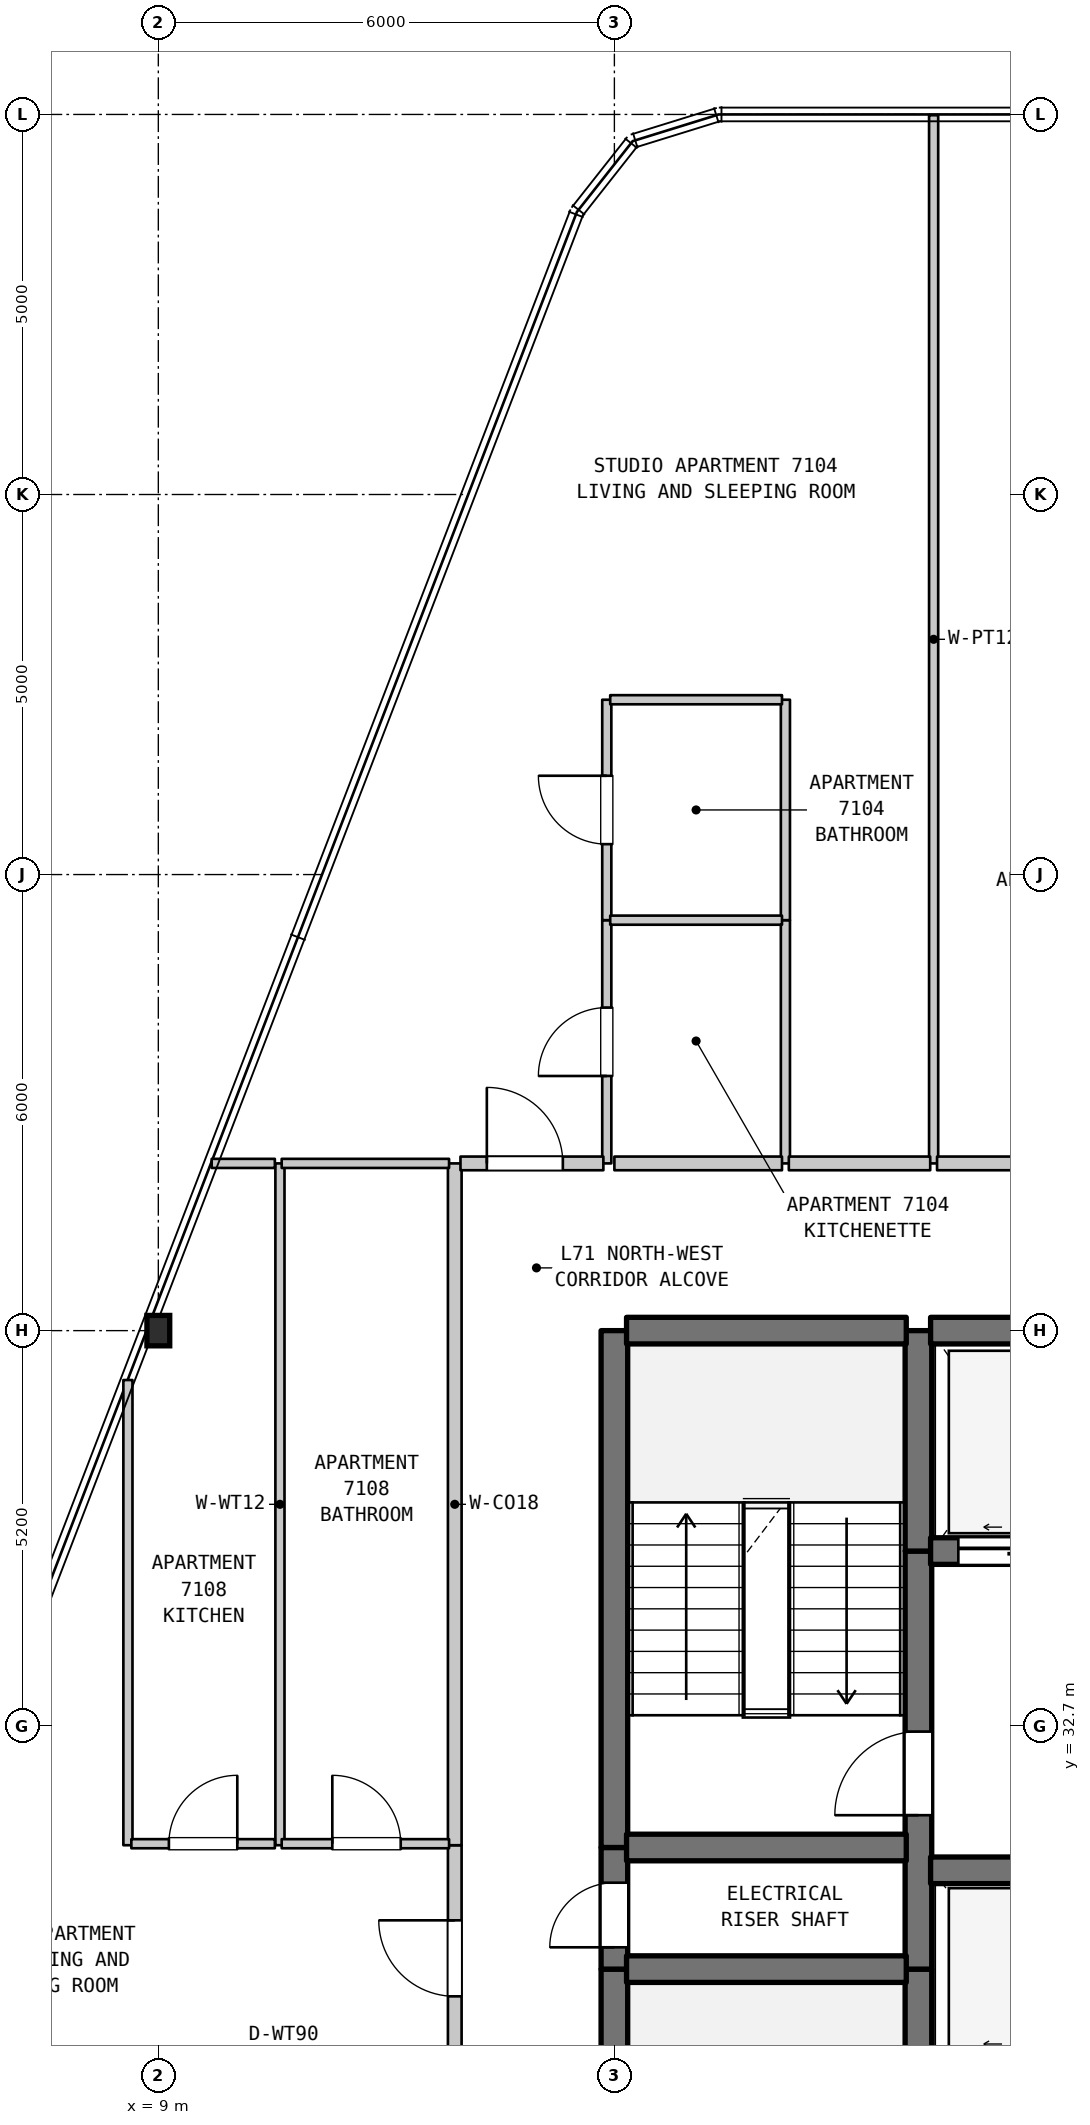
"""IFC4 building model, lengths in metres.
Left out: names, types, materials, properties, quantities, classifications, styles, units other than length and angle.
Written with IfcOpenShell. Run it as: python <this file> out.ifc"""

import sys

from ifc_helpers import new_model, si_unit, direction, frame, frame_2d, origin, origin_2d, place, context, subcontext, project, spatial, rectangle, i_section, extrude, element, fill, save


model = new_model("IFC4")
c1 = context("Model", 3, precision=1e-05, world=origin(), true_north=direction((0.0, 1.0)))
c2 = subcontext(c1, "Body", "Model", "MODEL_VIEW")
j1 = project(units=[si_unit("LENGTHUNIT", "METRE"), si_unit("PLANEANGLEUNIT", "RADIAN")], contexts=[c1])
p1 = place(None, origin())
s1 = spatial("IfcSite", under=j1, at=p1, CompositionType="ELEMENT")
p2 = place(p1, origin())
s2 = spatial("IfcBuilding", under=s1, at=p2, CompositionType="ELEMENT")
p3 = place(p2, frame((0.0, 0.0, 284.3)))
s3 = spatial("IfcBuildingStorey", under=s2, at=p3, CompositionType="ELEMENT", Elevation=284.3)
p4 = place(p3, frame((9.0, 37.9, 0.0), z_axis=(0.0, 0.0, 1.0), x_axis=(1.0, 0.0, 0.0)))
e1 = element("IfcColumn", 1, at=p4, inside=s3, PredefinedType="COLUMN", context=c2, shape_type="SweptSolid", body=[
    extrude(i_section(OverallWidth=0.3, OverallDepth=0.4, WebThickness=0.013, FlangeThickness=0.024, FilletRadius=0.027, at=origin_2d()), origin(), (0.0, 0.0, 1.0), 3.7),
])
p5 = place(p3, frame((8.6, 31.13, 0.0), z_axis=(0.0, 0.0, 1.0), x_axis=(0.0, 1.0, 0.0)))
e2 = element("IfcWall", 2, at=p5, inside=s3, PredefinedType="PARTITIONING", context=c2, shape_type="SweptSolid", body=[
    extrude(rectangle(XDim=6.12, YDim=0.12, at=frame_2d((3.06, 0.0))), origin(), (0.0, 0.0, 1.0), 3.39),
])
p6 = place(p3, frame((10.6, 31.13, 0.0), z_axis=(0.0, 0.0, 1.0), x_axis=(0.0, 1.0, 0.0)))
e3 = element("IfcWall", 3, at=p6, inside=s3, PredefinedType="PARTITIONING", context=c2, shape_type="SweptSolid", body=[
    extrude(rectangle(XDim=8.97, YDim=0.12, at=frame_2d((4.485, 0.0))), origin(), (0.0, 0.0, 1.0), 3.39),
])
p7 = place(p3, frame((12.9, 28.3, 0.0), z_axis=(0.0, 0.0, 1.0), x_axis=(0.0, 1.0, 0.0)))
e4 = element("IfcWall", 4, at=p7, inside=s3, PredefinedType="STANDARD", context=c2, shape_type="SweptSolid", body=[
    extrude(rectangle(XDim=2.83, YDim=0.18, at=frame_2d((1.415, 0.0))), origin(), (0.0, 0.0, 1.0), 3.39),
])
p8 = place(p7, frame((0.842, 0.0, 0.0)))
e5 = element("IfcOpeningElement", 5, at=p8, cuts=e4, PredefinedType="OPENING", context=c2, shape_type="SweptSolid", body=[
    extrude(rectangle(XDim=1.0, YDim=2.15, at=frame_2d((0.5, 1.075))), frame((0.0, 0.1, 0.0), z_axis=(0.0, -1.0, 0.0), x_axis=(1.0, 0.0, 0.0)), (0.0, 0.0, 1.0), 0.2),
])
p9 = place(p3, frame((12.9, 31.13, 0.0), z_axis=(0.0, 0.0, 1.0), x_axis=(0.0, 1.0, 0.0)))
e6 = element("IfcWall", 6, at=p9, inside=s3, PredefinedType="STANDARD", context=c2, shape_type="SweptSolid", body=[
    extrude(rectangle(XDim=8.97, YDim=0.18, at=frame_2d((4.485, 0.0))), origin(), (0.0, 0.0, 1.0), 3.39),
])
p10 = place(p3, frame((14.9, 40.1, 0.0), z_axis=(0.0, 0.0, 1.0), x_axis=(0.0, 1.0, 0.0)))
e7 = element("IfcWall", 7, at=p10, inside=s3, PredefinedType="PARTITIONING", context=c2, shape_type="SweptSolid", body=[
    extrude(rectangle(XDim=3.2, YDim=0.12, at=frame_2d((1.6, 0.0))), origin(), (0.0, 0.0, 1.0), 3.39),
])
p11 = place(p10, frame((1.15, 0.0, 0.0)))
e8 = element("IfcOpeningElement", 8, at=p11, cuts=e7, PredefinedType="OPENING", context=c2, shape_type="SweptSolid", body=[
    extrude(rectangle(XDim=0.9, YDim=2.15, at=frame_2d((0.45, 1.075))), frame((0.0, 0.07, 0.0), z_axis=(0.0, -1.0, 0.0), x_axis=(1.0, 0.0, 0.0)), (0.0, 0.0, 1.0), 0.14),
])
p12 = place(p3, frame((14.9, 43.3, 0.0), z_axis=(0.0, 0.0, 1.0), x_axis=(0.0, 1.0, 0.0)))
e9 = element("IfcWall", 9, at=p12, inside=s3, PredefinedType="PARTITIONING", context=c2, shape_type="SweptSolid", body=[
    extrude(rectangle(XDim=2.9, YDim=0.12, at=frame_2d((1.45, 0.0))), origin(), (0.0, 0.0, 1.0), 3.39),
])
p13 = place(p12, frame((1.0, 0.0, 0.0)))
e10 = element("IfcOpeningElement", 10, at=p13, cuts=e9, PredefinedType="OPENING", context=c2, shape_type="SweptSolid", body=[
    extrude(rectangle(XDim=0.9, YDim=2.1, at=frame_2d((0.45, 1.05))), frame((0.0, 0.07, 0.0), z_axis=(0.0, -1.0, 0.0), x_axis=(1.0, 0.0, 0.0)), (0.0, 0.0, 1.0), 0.14),
])
p14 = place(p3, frame((15.0, 22.7, 0.0), z_axis=(0.0, 0.0, 1.0), x_axis=(0.0, 1.0, 0.0)))
e11 = element("IfcWall", 11, at=p14, inside=s3, PredefinedType="SHEAR", context=c2, shape_type="SweptSolid", body=[
    extrude(rectangle(XDim=6.8, YDim=0.35, at=frame_2d((3.4, 0.0))), origin(), (0.0, 0.0, 1.0), 3.39),
])
p15 = place(p3, frame((15.0, 29.5, 0.0), z_axis=(0.0, 0.0, 1.0), x_axis=(0.0, 1.0, 0.0)))
e12 = element("IfcWall", 12, at=p15, inside=s3, PredefinedType="SHEAR", context=c2, shape_type="SweptSolid", body=[
    extrude(rectangle(XDim=1.6, YDim=0.35, at=frame_2d((0.8, 0.0))), origin(), (0.0, 0.0, 1.0), 3.39),
])
p16 = place(p15, frame((0.287, 0.0, 0.0)))
e13 = element("IfcOpeningElement", 13, at=p16, cuts=e12, PredefinedType="OPENING", context=c2, shape_type="SweptSolid", body=[
    extrude(rectangle(XDim=0.85, YDim=2.1, at=frame_2d((0.425, 1.05))), frame((0.0, 0.185, 0.0), z_axis=(0.0, -1.0, 0.0), x_axis=(1.0, 0.0, 0.0)), (0.0, 0.0, 1.0), 0.37),
])
p17 = place(p3, frame((15.0, 31.1, 0.0), z_axis=(0.0, 0.0, 1.0), x_axis=(0.0, 1.0, 0.0)))
e14 = element("IfcWall", 14, at=p17, inside=s3, PredefinedType="SHEAR", context=c2, shape_type="SweptSolid", body=[
    extrude(rectangle(XDim=6.8, YDim=0.35, at=frame_2d((3.4, 0.0))), origin(), (0.0, 0.0, 1.0), 3.39),
])
p18 = place(p3, frame((17.25, 40.1, 0.0), z_axis=(0.0, 0.0, 1.0), x_axis=(0.0, 1.0, 0.0)))
e15 = element("IfcWall", 15, at=p18, inside=s3, PredefinedType="PARTITIONING", context=c2, shape_type="SweptSolid", body=[
    extrude(rectangle(XDim=3.2, YDim=0.12, at=frame_2d((1.6, 0.0))), origin(), (0.0, 0.0, 1.0), 3.39),
])
p19 = place(p3, frame((17.25, 43.3, 0.0), z_axis=(0.0, 0.0, 1.0), x_axis=(0.0, 1.0, 0.0)))
e16 = element("IfcWall", 16, at=p19, inside=s3, PredefinedType="PARTITIONING", context=c2, shape_type="SweptSolid", body=[
    extrude(rectangle(XDim=2.9, YDim=0.12, at=frame_2d((1.45, 0.0))), origin(), (0.0, 0.0, 1.0), 3.39),
])
p20 = place(p3, frame((19.0, 28.2, 0.0), z_axis=(0.0, 0.0, 1.0), x_axis=(0.0, 1.0, 0.0)))
e17 = element("IfcWall", 17, at=p20, inside=s3, PredefinedType="SHEAR", context=c2, shape_type="SweptSolid", body=[
    extrude(rectangle(XDim=1.3, YDim=0.35, at=frame_2d((0.65, 0.0))), origin(), (0.0, 0.0, 1.0), 3.39),
])
p21 = place(p3, frame((19.0, 29.5, 0.0), z_axis=(0.0, 0.0, 1.0), x_axis=(0.0, 1.0, 0.0)))
e18 = element("IfcWall", 18, at=p21, inside=s3, PredefinedType="SHEAR", context=c2, shape_type="SweptSolid", body=[
    extrude(rectangle(XDim=5.5, YDim=0.35, at=frame_2d((2.75, 0.0))), origin(), (0.0, 0.0, 1.0), 3.39),
])
p22 = place(p21, frame((2.025, 0.0, 0.0)))
e19 = element("IfcOpeningElement", 19, at=p22, cuts=e18, PredefinedType="OPENING", context=c2, shape_type="SweptSolid", body=[
    extrude(rectangle(XDim=1.1, YDim=2.15, at=frame_2d((0.55, 1.075))), frame((0.0, 0.185, 0.0), z_axis=(0.0, -1.0, 0.0), x_axis=(1.0, 0.0, 0.0)), (0.0, 0.0, 1.0), 0.37),
])
p23 = place(p3, frame((19.0, 35.0, 0.0), z_axis=(0.0, 0.0, 1.0), x_axis=(0.0, 1.0, 0.0)))
e20 = element("IfcWall", 20, at=p23, inside=s3, PredefinedType="SHEAR", context=c2, shape_type="SweptSolid", body=[
    extrude(rectangle(XDim=2.9, YDim=0.35, at=frame_2d((1.45, 0.0))), origin(), (0.0, 0.0, 1.0), 3.39),
])
p24 = place(p3, frame((19.2, 40.1, 0.0), z_axis=(0.0, 0.0, 1.0), x_axis=(0.0, 1.0, 0.0)))
e21 = element("IfcWall", 21, at=p24, inside=s3, PredefinedType="PARTITIONING", context=c2, shape_type="SweptSolid", body=[
    extrude(rectangle(XDim=13.79, YDim=0.12, at=frame_2d((6.895, 0.0))), origin(), (0.0, 0.0, 1.0), 3.39),
])
p25 = place(p3, frame((15.16, 29.5, 0.0), z_axis=(0.0, 0.0, 1.0), x_axis=(1.0, 0.0, 0.0)))
e22 = element("IfcWall", 22, at=p25, inside=s3, PredefinedType="SHEAR", context=c2, shape_type="SweptSolid", body=[
    extrude(rectangle(XDim=3.68, YDim=0.35, at=frame_2d((1.84, 0.0))), origin(), (0.0, 0.0, 1.0), 3.39),
])
p26 = place(p3, frame((19.16, 30.8, 0.0), z_axis=(0.0, 0.0, 1.0), x_axis=(1.0, 0.0, 0.0)))
e23 = element("IfcWall", 23, at=p26, inside=s3, PredefinedType="SHEAR", context=c2, shape_type="SweptSolid", body=[
    extrude(rectangle(XDim=4.48, YDim=0.35, at=frame_2d((2.24, 0.0))), origin(), (0.0, 0.0, 1.0), 3.39),
])
p27 = place(p3, frame((15.16, 31.1, 0.0), z_axis=(0.0, 0.0, 1.0), x_axis=(1.0, 0.0, 0.0)))
e24 = element("IfcWall", 24, at=p27, inside=s3, PredefinedType="SHEAR", context=c2, shape_type="SweptSolid", body=[
    extrude(rectangle(XDim=3.68, YDim=0.35, at=frame_2d((1.84, 0.0))), origin(), (0.0, 0.0, 1.0), 3.39),
])
p28 = place(p3, frame((8.645, 31.15, 0.0), z_axis=(0.0, 0.0, 1.0), x_axis=(1.0, 0.0, 0.0)))
e25 = element("IfcWall", 25, at=p28, inside=s3, PredefinedType="PARTITIONING", context=c2, shape_type="SweptSolid", body=[
    extrude(rectangle(XDim=1.888, YDim=0.12, at=frame_2d((0.944, 0.0))), origin(), (0.0, 0.0, 1.0), 3.39),
])
p29 = place(p28, frame((0.494, 0.0, 0.0)))
e26 = element("IfcOpeningElement", 26, at=p29, cuts=e25, PredefinedType="OPENING", context=c2, shape_type="SweptSolid", body=[
    extrude(rectangle(XDim=0.9, YDim=2.15, at=frame_2d((0.45, 1.075))), frame((0.0, 0.07, 0.0), z_axis=(0.0, -1.0, 0.0), x_axis=(1.0, 0.0, 0.0)), (0.0, 0.0, 1.0), 0.14),
])
p30 = place(p3, frame((10.623, 31.15, 0.0), z_axis=(0.0, 0.0, 1.0), x_axis=(1.0, 0.0, 0.0)))
e27 = element("IfcWall", 27, at=p30, inside=s3, PredefinedType="PARTITIONING", context=c2, shape_type="SweptSolid", body=[
    extrude(rectangle(XDim=2.202, YDim=0.12, at=frame_2d((1.101, 0.0))), origin(), (0.0, 0.0, 1.0), 3.39),
])
p31 = place(p30, frame((0.666, 0.0, 0.0)))
e28 = element("IfcOpeningElement", 28, at=p31, cuts=e27, PredefinedType="OPENING", context=c2, shape_type="SweptSolid", body=[
    extrude(rectangle(XDim=0.9, YDim=2.1, at=frame_2d((0.45, 1.05))), frame((0.0, 0.07, 0.0), z_axis=(0.0, -1.0, 0.0), x_axis=(1.0, 0.0, 0.0)), (0.0, 0.0, 1.0), 0.14),
])
p32 = place(p3, frame((19.16, 35.0, 0.0), z_axis=(0.0, 0.0, 1.0), x_axis=(1.0, 0.0, 0.0)))
e29 = element("IfcWall", 29, at=p32, inside=s3, PredefinedType="SHEAR", context=c2, shape_type="SweptSolid", body=[
    extrude(rectangle(XDim=4.48, YDim=0.35, at=frame_2d((2.24, 0.0))), origin(), (0.0, 0.0, 1.0), 3.39),
])
p33 = place(p32, frame((0.365, 0.0, 0.0)))
e30 = element("IfcOpeningElement", 30, at=p33, cuts=e29, PredefinedType="OPENING", context=c2, shape_type="SweptSolid", body=[
    extrude(rectangle(XDim=1.35, YDim=2.2, at=frame_2d((0.675, 1.1))), frame((0.0, 0.185, 0.0), z_axis=(0.0, -1.0, 0.0), x_axis=(1.0, 0.0, 0.0)), (0.0, 0.0, 1.0), 0.37),
])
p34 = place(p32, frame((2.765, 0.0, 0.0)))
e31 = element("IfcOpeningElement", 31, at=p34, cuts=e29, PredefinedType="OPENING", context=c2, shape_type="SweptSolid", body=[
    extrude(rectangle(XDim=1.35, YDim=2.2, at=frame_2d((0.675, 1.1))), frame((0.0, 0.185, 0.0), z_axis=(0.0, -1.0, 0.0), x_axis=(1.0, 0.0, 0.0)), (0.0, 0.0, 1.0), 0.37),
])
p35 = place(p3, frame((15.16, 37.9, 0.0), z_axis=(0.0, 0.0, 1.0), x_axis=(1.0, 0.0, 0.0)))
e32 = element("IfcWall", 32, at=p35, inside=s3, PredefinedType="SHEAR", context=c2, shape_type="SweptSolid", body=[
    extrude(rectangle(XDim=3.68, YDim=0.35, at=frame_2d((1.84, 0.0))), origin(), (0.0, 0.0, 1.0), 3.39),
])
p36 = place(p3, frame((19.16, 37.9, 0.0), z_axis=(0.0, 0.0, 1.0), x_axis=(1.0, 0.0, 0.0)))
e33 = element("IfcWall", 33, at=p36, inside=s3, PredefinedType="SHEAR", context=c2, shape_type="SweptSolid", body=[
    extrude(rectangle(XDim=4.48, YDim=0.35, at=frame_2d((2.24, 0.0))), origin(), (0.0, 0.0, 1.0), 3.39),
])
p37 = place(p3, frame((9.702, 40.1, 0.0), z_axis=(0.0, 0.0, 1.0), x_axis=(1.0, 0.0, 0.0)))
e34 = element("IfcWall", 34, at=p37, inside=s3, PredefinedType="PARTITIONING", context=c2, shape_type="SweptSolid", body=[
    extrude(rectangle(XDim=0.831, YDim=0.12, at=frame_2d((0.416, 0.0))), origin(), (0.0, 0.0, 1.0), 3.39),
])
p38 = place(p3, frame((10.623, 40.1, 0.0), z_axis=(0.0, 0.0, 1.0), x_axis=(1.0, 0.0, 0.0)))
e35 = element("IfcWall", 35, at=p38, inside=s3, PredefinedType="PARTITIONING", context=c2, shape_type="SweptSolid", body=[
    extrude(rectangle(XDim=2.202, YDim=0.12, at=frame_2d((1.101, 0.0))), origin(), (0.0, 0.0, 1.0), 3.39),
])
p39 = place(p3, frame((12.975, 40.1, 0.0), z_axis=(0.0, 0.0, 1.0), x_axis=(1.0, 0.0, 0.0)))
e36 = element("IfcWall", 36, at=p39, inside=s3, PredefinedType="STANDARD", context=c2, shape_type="SweptSolid", body=[
    extrude(rectangle(XDim=1.88, YDim=0.18, at=frame_2d((0.94, 0.0))), origin(), (0.0, 0.0, 1.0), 3.39),
])
p40 = place(p39, frame((0.347, 0.0, 0.0)))
e37 = element("IfcOpeningElement", 37, at=p40, cuts=e36, PredefinedType="OPENING", context=c2, shape_type="SweptSolid", body=[
    extrude(rectangle(XDim=1.0, YDim=2.15, at=frame_2d((0.5, 1.075))), frame((0.0, 0.1, 0.0), z_axis=(0.0, -1.0, 0.0), x_axis=(1.0, 0.0, 0.0)), (0.0, 0.0, 1.0), 0.2),
])
p41 = place(p3, frame((15.0, 40.1, 0.0), z_axis=(0.0, 0.0, 1.0), x_axis=(1.0, 0.0, 0.0)))
e38 = element("IfcWall", 38, at=p41, inside=s3, PredefinedType="STANDARD", context=c2, shape_type="SweptSolid", body=[
    extrude(rectangle(XDim=2.205, YDim=0.18, at=frame_2d((1.103, 0.0))), origin(), (0.0, 0.0, 1.0), 3.39),
])
p42 = place(p3, frame((17.295, 40.1, 0.0), z_axis=(0.0, 0.0, 1.0), x_axis=(1.0, 0.0, 0.0)))
e39 = element("IfcWall", 39, at=p42, inside=s3, PredefinedType="STANDARD", context=c2, shape_type="SweptSolid", body=[
    extrude(rectangle(XDim=1.86, YDim=0.18, at=frame_2d((0.93, 0.0))), origin(), (0.0, 0.0, 1.0), 3.39),
])
p43 = place(p3, frame((19.245, 40.1, 0.0), z_axis=(0.0, 0.0, 1.0), x_axis=(1.0, 0.0, 0.0)))
e40 = element("IfcWall", 40, at=p43, inside=s3, PredefinedType="STANDARD", context=c2, shape_type="SweptSolid", body=[
    extrude(rectangle(XDim=4.42, YDim=0.18, at=frame_2d((2.21, 0.0))), origin(), (0.0, 0.0, 1.0), 3.39),
])
p44 = place(p43, frame((1.638, 0.0, 0.0)))
e41 = element("IfcOpeningElement", 41, at=p44, cuts=e40, PredefinedType="OPENING", context=c2, shape_type="SweptSolid", body=[
    extrude(rectangle(XDim=1.0, YDim=2.15, at=frame_2d((0.5, 1.075))), frame((0.0, 0.1, 0.0), z_axis=(0.0, -1.0, 0.0), x_axis=(1.0, 0.0, 0.0)), (0.0, 0.0, 1.0), 0.2),
])
for number, where, z_axis, x_axis in (
    (42, (14.945, 43.3, 0.0), (0.0, 0.0, 1.0), (1.0, 0.0, 0.0)),
    (43, (14.945, 46.2, 0.0), (0.0, 0.0, 1.0), (1.0, 0.0, 0.0)),
):
    element("IfcWall", number, at=place(p3, frame(where, z_axis=z_axis, x_axis=x_axis)), inside=s3, PredefinedType="PARTITIONING", context=c2, shape_type="SweptSolid", body=[
        extrude(rectangle(XDim=2.26, YDim=0.12, at=frame_2d((1.13, 0.0))), origin(), (0.0, 0.0, 1.0), 3.39),
    ])
p45 = place(p8, origin())
e44 = element("IfcDoor", 44, at=p45, inside=s3, OperationType="SINGLE_SWING_RIGHT", PredefinedType="DOOR", context=c2, shape_type="SweptSolid", body=[
    extrude(rectangle(XDim=1.0, YDim=2.15, at=frame_2d((0.5, 1.075))), frame((0.0, 0.025, 0.0), z_axis=(0.0, -1.0, 0.0), x_axis=(1.0, 0.0, 0.0)), (0.0, 0.0, 1.0), 0.05),
])
fill(e5, e44)
p46 = place(p11, origin())
e45 = element("IfcDoor", 45, at=p46, inside=s3, OperationType="SINGLE_SWING_LEFT", PredefinedType="DOOR", context=c2, shape_type="SweptSolid", body=[
    extrude(rectangle(XDim=0.9, YDim=2.15, at=frame_2d((0.45, 1.075))), frame((0.0, 0.025, 0.0), z_axis=(0.0, -1.0, 0.0), x_axis=(1.0, 0.0, 0.0)), (0.0, 0.0, 1.0), 0.05),
])
fill(e8, e45)
p47 = place(p13, origin())
e46 = element("IfcDoor", 46, at=p47, inside=s3, OperationType="SINGLE_SWING_RIGHT", PredefinedType="DOOR", context=c2, shape_type="SweptSolid", body=[
    extrude(rectangle(XDim=0.9, YDim=2.1, at=frame_2d((0.45, 1.05))), frame((0.0, 0.025, 0.0), z_axis=(0.0, -1.0, 0.0), x_axis=(1.0, 0.0, 0.0)), (0.0, 0.0, 1.0), 0.05),
])
fill(e10, e46)
p48 = place(p16, origin())
e47 = element("IfcDoor", 47, at=p48, inside=s3, OperationType="SINGLE_SWING_LEFT", PredefinedType="DOOR", context=c2, shape_type="SweptSolid", body=[
    extrude(rectangle(XDim=0.85, YDim=2.1, at=frame_2d((0.425, 1.05))), frame((0.0, 0.025, 0.0), z_axis=(0.0, -1.0, 0.0), x_axis=(1.0, 0.0, 0.0)), (0.0, 0.0, 1.0), 0.05),
])
fill(e13, e47)
p49 = place(p22, origin())
e48 = element("IfcDoor", 48, at=p49, inside=s3, OperationType="SINGLE_SWING_LEFT", PredefinedType="DOOR", context=c2, shape_type="SweptSolid", body=[
    extrude(rectangle(XDim=1.1, YDim=2.15, at=frame_2d((0.55, 1.075))), frame((0.0, 0.025, 0.0), z_axis=(0.0, -1.0, 0.0), x_axis=(1.0, 0.0, 0.0)), (0.0, 0.0, 1.0), 0.05),
])
fill(e19, e48)
p50 = place(p29, origin())
e49 = element("IfcDoor", 49, at=p50, inside=s3, OperationType="SINGLE_SWING_RIGHT", PredefinedType="DOOR", context=c2, shape_type="SweptSolid", body=[
    extrude(rectangle(XDim=0.9, YDim=2.15, at=frame_2d((0.45, 1.075))), frame((0.0, 0.025, 0.0), z_axis=(0.0, -1.0, 0.0), x_axis=(1.0, 0.0, 0.0)), (0.0, 0.0, 1.0), 0.05),
])
fill(e26, e49)
p51 = place(p31, origin())
e50 = element("IfcDoor", 50, at=p51, inside=s3, OperationType="SINGLE_SWING_LEFT", PredefinedType="DOOR", context=c2, shape_type="SweptSolid", body=[
    extrude(rectangle(XDim=0.9, YDim=2.1, at=frame_2d((0.45, 1.05))), frame((0.0, 0.025, 0.0), z_axis=(0.0, -1.0, 0.0), x_axis=(1.0, 0.0, 0.0)), (0.0, 0.0, 1.0), 0.05),
])
fill(e28, e50)
p52 = place(p33, origin())
e51 = element("IfcDoor", 51, at=p52, inside=s3, OperationType="DOUBLE_DOOR_SLIDING", PredefinedType="DOOR", context=c2, shape_type="SweptSolid", body=[
    extrude(rectangle(XDim=1.35, YDim=2.2, at=frame_2d((0.675, 1.1))), frame((0.0, 0.025, 0.0), z_axis=(0.0, -1.0, 0.0), x_axis=(1.0, 0.0, 0.0)), (0.0, 0.0, 1.0), 0.05),
])
fill(e30, e51)
p53 = place(p40, origin())
e52 = element("IfcDoor", 52, at=p53, inside=s3, OperationType="SINGLE_SWING_LEFT", PredefinedType="DOOR", context=c2, shape_type="SweptSolid", body=[
    extrude(rectangle(XDim=1.0, YDim=2.15, at=frame_2d((0.5, 1.075))), frame((0.0, 0.025, 0.0), z_axis=(0.0, -1.0, 0.0), x_axis=(1.0, 0.0, 0.0)), (0.0, 0.0, 1.0), 0.05),
])
fill(e37, e52)
save(model, sys.argv[1])
